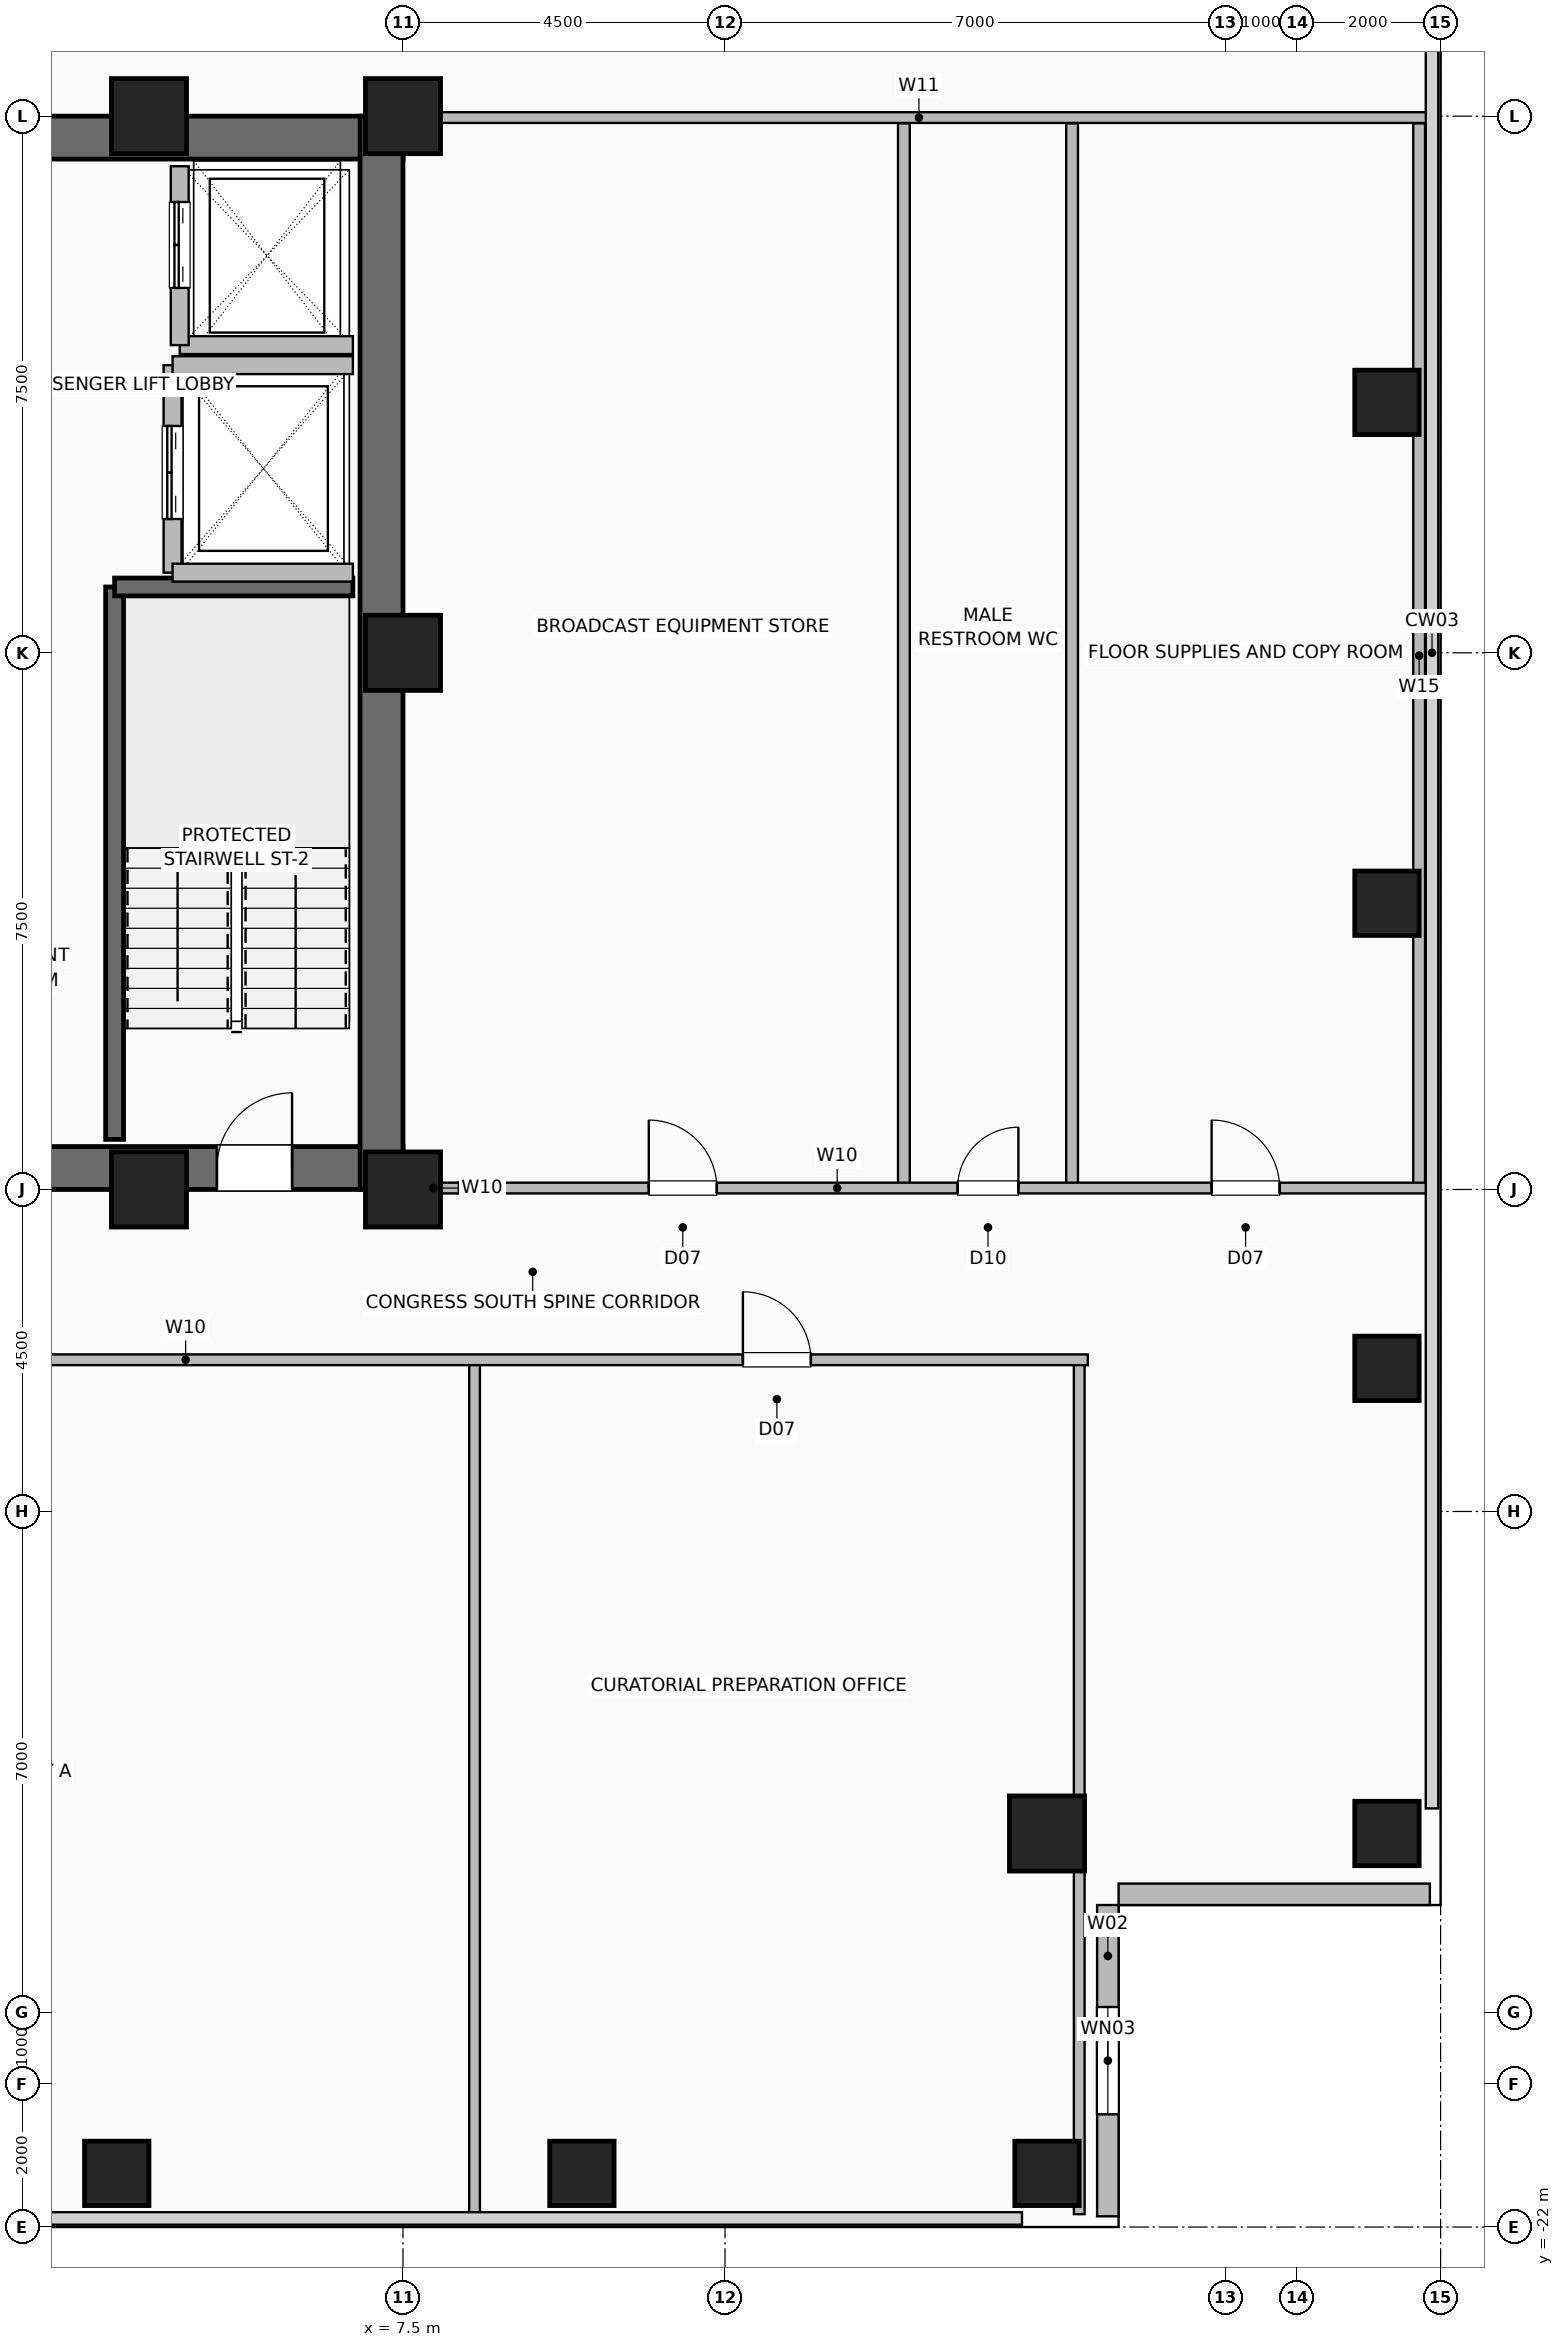
"""IFC4 building model, lengths in metres.
Left out: names, types, materials, properties, quantities, classifications, styles, units other than length and angle.
Written with IfcOpenShell. Run it as: python <this file> out.ifc"""

import sys

from ifc_helpers import new_model, si_unit, direction, frame, frame_2d, origin, origin_2d, place, context, subcontext, project, spatial, rectangle, hollow_rectangle, extrude, element, fill, save


model = new_model("IFC4")
c1 = context("Model", 3, precision=1e-05, world=origin(), true_north=direction((0.0, 1.0)))
c2 = subcontext(c1, "Body", "Model", "MODEL_VIEW")
j1 = project(units=[si_unit("LENGTHUNIT", "METRE"), si_unit("PLANEANGLEUNIT", "RADIAN")], contexts=[c1])
p1 = place(None, origin())
s1 = spatial("IfcSite", under=j1, at=p1, CompositionType="ELEMENT")
p2 = place(p1, origin())
s2 = spatial("IfcBuilding", under=s1, at=p2, CompositionType="ELEMENT")
p3 = place(p2, frame((0.0, 0.0, 140.8)))
s3 = spatial("IfcBuildingStorey", under=s2, at=p3, CompositionType="ELEMENT", Elevation=140.8)
for number, where, z_axis, x_axis in (
    (1, (3.95, -7.5, 0.0), (0.0, 0.0, 1.0), (1.0, 0.0, 0.0)),
    (2, (7.5, -7.5, 0.0), (0.0, 0.0, 1.0), (1.0, 0.0, 0.0)),
    (3, (7.5, 0.0, 0.0), (0.0, 0.0, 1.0), (1.0, 0.0, 0.0)),
    (4, (7.5, 7.5, 0.0), (0.0, 0.0, 1.0), (1.0, 0.0, 0.0)),
    (5, (3.95, 7.5, 0.0), (0.0, 0.0, 1.0), (1.0, 0.0, 0.0)),
):
    element("IfcColumn", number, at=place(p3, frame(where, z_axis=z_axis, x_axis=x_axis)), inside=s3, PredefinedType="COLUMN", context=c2, shape_type="SweptSolid", body=[
        extrude(hollow_rectangle(XDim=1.05, YDim=1.05, WallThickness=0.05, at=origin_2d()), origin(), (0.0, 0.0, 1.0), 3.6),
    ])
for number, where, z_axis, x_axis in (
    (6, (21.25, -16.5, 0.0), (0.0, 0.0, 1.0), (1.0, 0.0, 0.0)),
    (7, (21.25, -10.0, 0.0), (0.0, 0.0, 1.0), (1.0, 0.0, 0.0)),
    (8, (21.25, -3.5, 0.0), (0.0, 0.0, 1.0), (1.0, 0.0, 0.0)),
    (9, (3.5, -21.25, 0.0), (0.0, 0.0, 1.0), (1.0, 0.0, 0.0)),
    (10, (21.25, 3.5, 0.0), (0.0, 0.0, 1.0), (1.0, 0.0, 0.0)),
    (11, (10.0, -21.25, 0.0), (0.0, 0.0, 1.0), (1.0, 0.0, 0.0)),
    (12, (16.5, -21.25, 0.0), (0.0, 0.0, 1.0), (1.0, 0.0, 0.0)),
):
    element("IfcColumn", number, at=place(p3, frame(where, z_axis=z_axis, x_axis=x_axis)), inside=s3, PredefinedType="COLUMN", context=c2, shape_type="SweptSolid", body=[
        extrude(hollow_rectangle(XDim=0.9, YDim=0.9, WallThickness=0.045, at=origin_2d()), origin(), (0.0, 0.0, 1.0), 3.6),
    ])
p4 = place(p3, frame((16.5, -16.5, 0.0), z_axis=(0.0, 0.0, 1.0), x_axis=(1.0, 0.0, 0.0)))
e13 = element("IfcColumn", 13, at=p4, inside=s3, PredefinedType="COLUMN", context=c2, shape_type="SweptSolid", body=[
    extrude(hollow_rectangle(XDim=1.05, YDim=1.05, WallThickness=0.05, at=origin_2d()), origin(), (0.0, 0.0, 1.0), 3.6),
])
p5 = place(p3, frame((17.35, -21.85, 0.0), z_axis=(0.0, 0.0, 1.0), x_axis=(0.0, 1.0, 0.0)))
e14 = element("IfcWall", 14, at=p5, inside=s3, PredefinedType="SOLIDWALL", context=c2, shape_type="SweptSolid", body=[
    extrude(rectangle(XDim=4.35, YDim=0.3, at=frame_2d((2.175, 0.0))), origin(), (0.0, 0.0, 1.0), 3.36),
])
p6 = place(p5, frame((1.425, 0.0, 0.9)))
e15 = element("IfcOpeningElement", 15, at=p6, cuts=e14, PredefinedType="OPENING", context=c2, shape_type="SweptSolid", body=[
    extrude(rectangle(XDim=1.5, YDim=1.8, at=frame_2d((0.75, 0.9))), frame((0.0, 0.16, 0.0), z_axis=(0.0, -1.0, 0.0), x_axis=(1.0, 0.0, 0.0)), (0.0, 0.0, 1.0), 0.32),
])
p7 = place(p3, frame((21.85, -17.35, 0.0), z_axis=(0.0, 0.0, 1.0), x_axis=(-1.0, 0.0, 0.0)))
e16 = element("IfcWall", 16, at=p7, inside=s3, PredefinedType="SOLIDWALL", context=c2, shape_type="SweptSolid", body=[
    extrude(rectangle(XDim=4.35, YDim=0.3, at=frame_2d((2.175, 0.0))), origin(), (0.0, 0.0, 1.0), 3.36),
])
p8 = place(p3, frame((-7.5, -7.2, 0.0), z_axis=(0.0, 0.0, 1.0), x_axis=(1.0, 0.0, 0.0)))
e17 = element("IfcWall", 17, at=p8, inside=s3, PredefinedType="SHEAR", context=c2, shape_type="SweptSolid", body=[
    extrude(rectangle(XDim=15.0, YDim=0.6, at=frame_2d((7.5, 0.0))), origin(), (0.0, 0.0, 1.0), 3.36),
])
p9 = place(p8, frame((1.55, 0.0, 0.0)))
e18 = element("IfcOpeningElement", 18, at=p9, cuts=e17, PredefinedType="OPENING", context=c2, shape_type="SweptSolid", body=[
    extrude(rectangle(XDim=1.05, YDim=2.08, at=frame_2d((0.525, 1.04))), frame((0.0, 0.31, 0.0), z_axis=(0.0, -1.0, 0.0), x_axis=(1.0, 0.0, 0.0)), (0.0, 0.0, 1.0), 0.62),
])
p10 = place(p8, frame((12.4, 0.0, 0.0)))
e19 = element("IfcOpeningElement", 19, at=p10, cuts=e17, PredefinedType="OPENING", context=c2, shape_type="SweptSolid", body=[
    extrude(rectangle(XDim=1.05, YDim=2.08, at=frame_2d((0.525, 1.04))), frame((0.0, 0.31, 0.0), z_axis=(0.0, -1.0, 0.0), x_axis=(1.0, 0.0, 0.0)), (0.0, 0.0, 1.0), 0.62),
])
p11 = place(p8, frame((5.2, 0.0, 0.0)))
e20 = element("IfcOpeningElement", 20, at=p11, cuts=e17, PredefinedType="OPENING", context=c2, shape_type="SweptSolid", body=[
    extrude(rectangle(XDim=1.0, YDim=2.08, at=frame_2d((0.5, 1.04))), frame((0.0, 0.31, 0.0), z_axis=(0.0, -1.0, 0.0), x_axis=(1.0, 0.0, 0.0)), (0.0, 0.0, 1.0), 0.62),
])
p12 = place(p8, frame((8.65, 0.0, 0.0)))
e21 = element("IfcOpeningElement", 21, at=p12, cuts=e17, PredefinedType="OPENING", context=c2, shape_type="SweptSolid", body=[
    extrude(rectangle(XDim=1.0, YDim=2.08, at=frame_2d((0.5, 1.04))), frame((0.0, 0.31, 0.0), z_axis=(0.0, -1.0, 0.0), x_axis=(1.0, 0.0, 0.0)), (0.0, 0.0, 1.0), 0.62),
])
for number, where, z_axis, x_axis in (
    (22, (-7.5, 7.2, 0.0), (0.0, 0.0, 1.0), (1.0, 0.0, 0.0)),
    (23, (7.2, -7.5, 0.0), (0.0, 0.0, 1.0), (0.0, 1.0, 0.0)),
):
    element("IfcWall", number, at=place(p3, frame(where, z_axis=z_axis, x_axis=x_axis)), inside=s3, PredefinedType="SHEAR", context=c2, shape_type="SweptSolid", body=[
        extrude(rectangle(XDim=15.0, YDim=0.6, at=frame_2d((7.5, 0.0))), origin(), (0.0, 0.0, 1.0), 3.36),
    ])
p13 = place(p3, frame((3.47, -6.8, 0.0), z_axis=(0.0, 0.0, 1.0), x_axis=(0.0, 1.0, 0.0)))
e24 = element("IfcWall", 24, at=p13, inside=s3, PredefinedType="SHEAR", context=c2, shape_type="SweptSolid", body=[
    extrude(rectangle(XDim=7.72, YDim=0.25, at=frame_2d((3.86, 0.0))), origin(), (0.0, 0.0, 1.0), 3.36),
])
p14 = place(p3, frame((3.47, 0.92, 0.0), z_axis=(0.0, 0.0, 1.0), x_axis=(1.0, 0.0, 0.0)))
e25 = element("IfcWall", 25, at=p14, inside=s3, PredefinedType="SHEAR", context=c2, shape_type="SweptSolid", body=[
    extrude(rectangle(XDim=3.33, YDim=0.25, at=frame_2d((1.665, 0.0))), origin(), (0.0, 0.0, 1.0), 3.36),
])
p15 = place(p3, frame((4.38, 4.3, 0.0), z_axis=(0.0, 0.0, 1.0), x_axis=(1.0, 0.0, 0.0)))
e26 = element("IfcWall", 26, at=p15, inside=s3, PredefinedType="SHEAR", context=c2, shape_type="SweptSolid", body=[
    extrude(rectangle(XDim=2.42, YDim=0.25, at=frame_2d((1.21, 0.0))), origin(), (0.0, 0.0, 1.0), 3.36),
])
p16 = place(p3, frame((4.38, 4.3, 0.0), z_axis=(0.0, 0.0, 1.0), x_axis=(0.0, 1.0, 0.0)))
e27 = element("IfcWall", 27, at=p16, inside=s3, PredefinedType="SHEAR", context=c2, shape_type="SweptSolid", body=[
    extrude(rectangle(XDim=2.5, YDim=0.25, at=frame_2d((1.25, 0.0))), origin(), (0.0, 0.0, 1.0), 3.36),
])
p17 = place(p16, frame((0.8, 0.0, 0.0)))
e28 = element("IfcOpeningElement", 28, at=p17, cuts=e27, PredefinedType="OPENING", context=c2, shape_type="SweptSolid", body=[
    extrude(rectangle(XDim=1.2, YDim=2.2, at=frame_2d((0.6, 1.1))), frame((0.0, 0.135, 0.0), z_axis=(0.0, -1.0, 0.0), x_axis=(1.0, 0.0, 0.0)), (0.0, 0.0, 1.0), 0.27),
])
p18 = place(p3, frame((4.28, 1.12, 0.0), z_axis=(0.0, 0.0, 1.0), x_axis=(0.0, 1.0, 0.0)))
e29 = element("IfcWall", 29, at=p18, inside=s3, PredefinedType="SHEAR", context=c2, shape_type="SweptSolid", body=[
    extrude(rectangle(XDim=2.9, YDim=0.25, at=frame_2d((1.45, 0.0))), origin(), (0.0, 0.0, 1.0), 3.36),
])
p19 = place(p18, frame((0.75, 0.0, 0.0)))
e30 = element("IfcOpeningElement", 30, at=p19, cuts=e29, PredefinedType="OPENING", context=c2, shape_type="SweptSolid", body=[
    extrude(rectangle(XDim=1.3, YDim=2.3, at=frame_2d((0.65, 1.15))), frame((0.0, 0.135, 0.0), z_axis=(0.0, -1.0, 0.0), x_axis=(1.0, 0.0, 0.0)), (0.0, 0.0, 1.0), 0.27),
])
for number, where, z_axis, x_axis in (
    (31, (4.28, 1.12, 0.0), (0.0, 0.0, 1.0), (1.0, 0.0, 0.0)),
    (32, (4.28, 4.02, 0.0), (0.0, 0.0, 1.0), (1.0, 0.0, 0.0)),
):
    element("IfcWall", number, at=place(p3, frame(where, z_axis=z_axis, x_axis=x_axis)), inside=s3, PredefinedType="SHEAR", context=c2, shape_type="SweptSolid", body=[
        extrude(rectangle(XDim=2.52, YDim=0.25, at=frame_2d((1.26, 0.0))), origin(), (0.0, 0.0, 1.0), 3.36),
    ])
for number, where, z_axis, x_axis in (
    (33, (8.5, -21.82, 0.0), (0.0, 0.0, 1.0), (0.0, 1.0, 0.0)),
    (34, (16.95, -21.82, 0.0), (0.0, 0.0, 1.0), (0.0, 1.0, 0.0)),
):
    element("IfcWall", number, at=place(p3, frame(where, z_axis=z_axis, x_axis=x_axis)), inside=s3, PredefinedType="PARTITIONING", context=c2, shape_type="SweptSolid", body=[
        extrude(rectangle(XDim=11.94, YDim=0.15, at=frame_2d((5.97, 0.0))), origin(), (0.0, 0.0, 1.0), 3.36),
    ])
p20 = place(p3, frame((-17.07, -9.88, 0.0), z_axis=(0.0, 0.0, 1.0), x_axis=(1.0, 0.0, 0.0)))
e35 = element("IfcWall", 35, at=p20, inside=s3, PredefinedType="PARTITIONING", context=c2, shape_type="SweptSolid", body=[
    extrude(rectangle(XDim=34.14, YDim=0.15, at=frame_2d((17.07, 0.0))), origin(), (0.0, 0.0, 1.0), 3.36),
])
p21 = place(p20, frame((11.945, 0.0, 0.0)))
e36 = element("IfcOpeningElement", 36, at=p21, cuts=e35, PredefinedType="OPENING", context=c2, shape_type="SweptSolid", body=[
    extrude(rectangle(XDim=1.8, YDim=2.08, at=frame_2d((0.9, 1.04))), frame((0.0, 0.085, 0.0), z_axis=(0.0, -1.0, 0.0), x_axis=(1.0, 0.0, 0.0)), (0.0, 0.0, 1.0), 0.17),
])
p22 = place(p20, frame((29.32, 0.0, 0.0)))
e37 = element("IfcOpeningElement", 37, at=p22, cuts=e35, PredefinedType="OPENING", context=c2, shape_type="SweptSolid", body=[
    extrude(rectangle(XDim=0.95, YDim=2.06, at=frame_2d((0.475, 1.03))), frame((0.0, 0.085, 0.0), z_axis=(0.0, -1.0, 0.0), x_axis=(1.0, 0.0, 0.0)), (0.0, 0.0, 1.0), 0.17),
])
p23 = place(p3, frame((7.45, -7.48, 0.0), z_axis=(0.0, 0.0, 1.0), x_axis=(1.0, 0.0, 0.0)))
e38 = element("IfcWall", 38, at=p23, inside=s3, PredefinedType="PARTITIONING", context=c2, shape_type="SweptSolid", body=[
    extrude(rectangle(XDim=0.95, YDim=0.15, at=frame_2d((0.475, 0.0))), origin(), (0.0, 0.0, 1.0), 3.36),
])
for number, where, z_axis, x_axis in (
    (39, (16.85, -7.48, 0.0), (0.0, 0.0, 1.0), (0.0, 1.0, 0.0)),
    (40, (14.5, -7.48, 0.0), (0.0, 0.0, 1.0), (0.0, 1.0, 0.0)),
    (41, (21.7, -7.48, 0.0), (0.0, 0.0, 1.0), (0.0, 1.0, 0.0)),
):
    element("IfcWall", number, at=place(p3, frame(where, z_axis=z_axis, x_axis=x_axis)), inside=s3, PredefinedType="PLUMBINGWALL", context=c2, shape_type="SweptSolid", body=[
        extrude(rectangle(XDim=14.88, YDim=0.165, at=frame_2d((7.44, 0.0))), origin(), (0.0, 0.0, 1.0), 3.36),
    ])
p24 = place(p3, frame((8.28, -7.48, 0.0), z_axis=(0.0, 0.0, 1.0), x_axis=(1.0, 0.0, 0.0)))
e42 = element("IfcWall", 42, at=p24, inside=s3, PredefinedType="PARTITIONING", context=c2, shape_type="SweptSolid", body=[
    extrude(rectangle(XDim=13.54, YDim=0.15, at=frame_2d((6.77, 0.0))), origin(), (0.0, 0.0, 1.0), 3.36),
])
p25 = place(p24, frame((2.655, 0.0, 0.0)))
e43 = element("IfcOpeningElement", 43, at=p25, cuts=e42, PredefinedType="OPENING", context=c2, shape_type="SweptSolid", body=[
    extrude(rectangle(XDim=0.95, YDim=2.06, at=frame_2d((0.475, 1.03))), frame((0.0, 0.085, 0.0), z_axis=(0.0, -1.0, 0.0), x_axis=(1.0, 0.0, 0.0)), (0.0, 0.0, 1.0), 0.17),
])
p26 = place(p24, frame((6.97, 0.0, 0.0)))
e44 = element("IfcOpeningElement", 44, at=p26, cuts=e42, PredefinedType="OPENING", context=c2, shape_type="SweptSolid", body=[
    extrude(rectangle(XDim=0.85, YDim=2.05, at=frame_2d((0.425, 1.025))), frame((0.0, 0.085, 0.0), z_axis=(0.0, -1.0, 0.0), x_axis=(1.0, 0.0, 0.0)), (0.0, 0.0, 1.0), 0.17),
])
p27 = place(p24, frame((10.52, 0.0, 0.0)))
e45 = element("IfcOpeningElement", 45, at=p27, cuts=e42, PredefinedType="OPENING", context=c2, shape_type="SweptSolid", body=[
    extrude(rectangle(XDim=0.95, YDim=2.06, at=frame_2d((0.475, 1.03))), frame((0.0, 0.085, 0.0), z_axis=(0.0, -1.0, 0.0), x_axis=(1.0, 0.0, 0.0)), (0.0, 0.0, 1.0), 0.17),
])
p28 = place(p3, frame((7.6, 7.48, 0.0), z_axis=(0.0, 0.0, 1.0), x_axis=(1.0, 0.0, 0.0)))
e46 = element("IfcWall", 46, at=p28, inside=s3, PredefinedType="PARTITIONING", context=c2, shape_type="SweptSolid", body=[
    extrude(rectangle(XDim=14.22, YDim=0.15, at=frame_2d((7.11, 0.0))), origin(), (0.0, 0.0, 1.0), 3.36),
])
p29 = place(p6, origin())
e47 = element("IfcWindow", 47, at=p29, inside=s3, PartitioningType="SINGLE_PANEL", PredefinedType="WINDOW", context=c2, shape_type="SweptSolid", body=[
    extrude(rectangle(XDim=1.5, YDim=1.8, at=frame_2d((0.75, 0.9))), frame((0.0, 0.03, 0.0), z_axis=(0.0, -1.0, 0.0), x_axis=(1.0, 0.0, 0.0)), (0.0, 0.0, 1.0), 0.06),
])
fill(e15, e47)
p30 = place(p10, origin())
e48 = element("IfcDoor", 48, at=p30, inside=s3, OperationType="SINGLE_SWING_RIGHT", PredefinedType="DOOR", context=c2, shape_type="SweptSolid", body=[
    extrude(rectangle(XDim=1.05, YDim=2.08, at=frame_2d((0.525, 1.04))), frame((0.0, 0.025, 0.0), z_axis=(0.0, -1.0, 0.0), x_axis=(1.0, 0.0, 0.0)), (0.0, 0.0, 1.0), 0.05),
])
fill(e19, e48)
p31 = place(p17, origin())
e49 = element("IfcDoor", 49, at=p31, inside=s3, OperationType="DOUBLE_DOOR_SLIDING", PredefinedType="DOOR", context=c2, shape_type="SweptSolid", body=[
    extrude(rectangle(XDim=1.2, YDim=2.2, at=frame_2d((0.6, 1.1))), frame((0.0, 0.025, 0.0), z_axis=(0.0, -1.0, 0.0), x_axis=(1.0, 0.0, 0.0)), (0.0, 0.0, 1.0), 0.05),
])
fill(e28, e49)
p32 = place(p19, origin())
e50 = element("IfcDoor", 50, at=p32, inside=s3, OperationType="DOUBLE_DOOR_SLIDING", PredefinedType="DOOR", context=c2, shape_type="SweptSolid", body=[
    extrude(rectangle(XDim=1.3, YDim=2.3, at=frame_2d((0.65, 1.15))), frame((0.0, 0.025, 0.0), z_axis=(0.0, -1.0, 0.0), x_axis=(1.0, 0.0, 0.0)), (0.0, 0.0, 1.0), 0.05),
])
fill(e30, e50)
p33 = place(p22, origin())
e51 = element("IfcDoor", 51, at=p33, inside=s3, OperationType="SINGLE_SWING_LEFT", PredefinedType="DOOR", context=c2, shape_type="SweptSolid", body=[
    extrude(rectangle(XDim=0.95, YDim=2.06, at=frame_2d((0.475, 1.03))), frame((0.0, 0.025, 0.0), z_axis=(0.0, -1.0, 0.0), x_axis=(1.0, 0.0, 0.0)), (0.0, 0.0, 1.0), 0.05),
])
fill(e37, e51)
p34 = place(p25, origin())
e52 = element("IfcDoor", 52, at=p34, inside=s3, OperationType="SINGLE_SWING_LEFT", PredefinedType="DOOR", context=c2, shape_type="SweptSolid", body=[
    extrude(rectangle(XDim=0.95, YDim=2.06, at=frame_2d((0.475, 1.03))), frame((0.0, 0.025, 0.0), z_axis=(0.0, -1.0, 0.0), x_axis=(1.0, 0.0, 0.0)), (0.0, 0.0, 1.0), 0.05),
])
fill(e43, e52)
p35 = place(p26, origin())
e53 = element("IfcDoor", 53, at=p35, inside=s3, OperationType="SINGLE_SWING_RIGHT", PredefinedType="DOOR", context=c2, shape_type="SweptSolid", body=[
    extrude(rectangle(XDim=0.85, YDim=2.05, at=frame_2d((0.425, 1.025))), frame((0.0, 0.025, 0.0), z_axis=(0.0, -1.0, 0.0), x_axis=(1.0, 0.0, 0.0)), (0.0, 0.0, 1.0), 0.05),
])
fill(e44, e53)
p36 = place(p27, origin())
e54 = element("IfcDoor", 54, at=p36, inside=s3, OperationType="SINGLE_SWING_LEFT", PredefinedType="DOOR", context=c2, shape_type="SweptSolid", body=[
    extrude(rectangle(XDim=0.95, YDim=2.06, at=frame_2d((0.475, 1.03))), frame((0.0, 0.025, 0.0), z_axis=(0.0, -1.0, 0.0), x_axis=(1.0, 0.0, 0.0)), (0.0, 0.0, 1.0), 0.05),
])
fill(e45, e54)
save(model, sys.argv[1])
